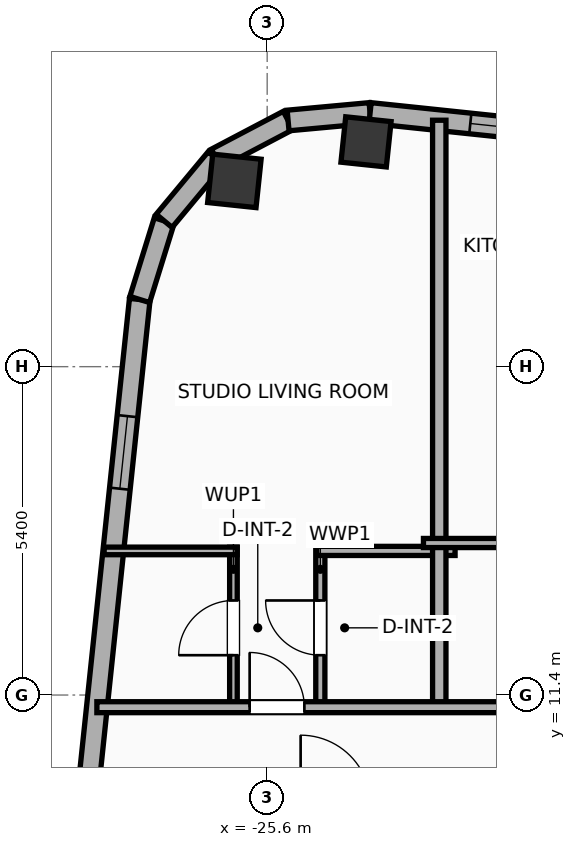
"""IFC4 building model, lengths in metres.
Left out: names, types, materials, properties, quantities, classifications, styles, units other than length and angle.
Written with IfcOpenShell. Run it as: python <this file> out.ifc"""

import sys

from ifc_helpers import new_model, si_unit, direction, frame, frame_2d, origin, origin_2d, place, context, subcontext, project, spatial, rectangle, hollow_rectangle, hollow_circle, extrude, element, fill, save


model = new_model("IFC4")
c1 = context("Model", 3, precision=1e-05, world=origin(), true_north=direction((0.0, 1.0)))
c2 = subcontext(c1, "Body", "Model", "MODEL_VIEW")
j1 = project(units=[si_unit("LENGTHUNIT", "METRE"), si_unit("PLANEANGLEUNIT", "RADIAN")], contexts=[c1])
p1 = place(None, origin())
s1 = spatial("IfcSite", under=j1, at=p1, CompositionType="ELEMENT")
p2 = place(p1, origin())
s2 = spatial("IfcBuilding", under=s1, at=p2, CompositionType="ELEMENT")
p3 = place(p2, frame((0.0, 0.0, 287.3)))
s3 = spatial("IfcBuildingStorey", under=s2, at=p3, CompositionType="ELEMENT", Elevation=287.3)
p4 = place(p3, frame((-23.975, 20.497, 0.0), z_axis=(0.0, 0.0, 1.0), x_axis=(0.994521895368, -0.104528463268, 0.0)))
e1 = element("IfcColumn", 1, at=p4, inside=s3, PredefinedType="COLUMN", context=c2, shape_type="SweptSolid", body=[
    extrude(hollow_rectangle(XDim=0.75, YDim=0.75, WallThickness=0.025, at=origin_2d()), origin(), (0.0, 0.0, 1.0), 3.9),
])
p5 = place(p3, frame((-26.139, 19.855, 0.0), z_axis=(0.0, 0.0, 1.0), x_axis=(0.994521895368, -0.104528463268, 0.0)))
e2 = element("IfcColumn", 2, at=p5, inside=s3, PredefinedType="COLUMN", context=c2, shape_type="SweptSolid", body=[
    extrude(hollow_circle(Radius=0.4, WallThickness=0.028, at=origin_2d()), origin(), (0.0, 0.0, 1.0), 3.9),
])
p6 = place(p3, frame((-30.87, -12.296, 0.0), z_axis=(0.0, 0.0, 1.0), x_axis=(0.104533282919, 0.994521388791, 0.0)))
e3 = element("IfcWall", 3, at=p6, inside=s3, PredefinedType="ELEMENTEDWALL", context=c2, shape_type="SweptSolid", body=[
    extrude(rectangle(XDim=30.366, YDim=0.34, at=frame_2d((15.183, 0.0))), origin(), (0.0, 0.0, 1.0), 3.635),
])
p7 = place(p6, frame((5.842, 0.0, 0.75)))
e4 = element("IfcOpeningElement", 4, at=p7, cuts=e3, PredefinedType="OPENING", context=c2, shape_type="SweptSolid", body=[
    extrude(rectangle(XDim=1.8, YDim=2.1, at=frame_2d((0.9, 1.05))), frame((0.0, 0.18, 0.0), z_axis=(0.0, -1.0, 0.0), x_axis=(1.0, 0.0, 0.0)), (0.0, 0.0, 1.0), 0.36),
])
p8 = place(p6, frame((27.238, 0.0, 0.75)))
e5 = element("IfcOpeningElement", 5, at=p8, cuts=e3, PredefinedType="OPENING", context=c2, shape_type="SweptSolid", body=[
    extrude(rectangle(XDim=1.2, YDim=2.05, at=frame_2d((0.6, 1.025))), frame((0.0, 0.18, 0.0), z_axis=(0.0, -1.0, 0.0), x_axis=(1.0, 0.0, 0.0)), (0.0, 0.0, 1.0), 0.36),
])
p9 = place(p6, frame((16.688, 0.0, 0.75)))
e6 = element("IfcOpeningElement", 6, at=p9, cuts=e3, PredefinedType="OPENING", context=c2, shape_type="SweptSolid", body=[
    extrude(rectangle(XDim=1.2, YDim=2.05, at=frame_2d((0.6, 1.025))), frame((0.0, 0.18, 0.0), z_axis=(0.0, -1.0, 0.0), x_axis=(1.0, 0.0, 0.0)), (0.0, 0.0, 1.0), 0.36),
])
p10 = place(p3, frame((-27.696, 17.905, 0.0), z_axis=(0.0, 0.0, 1.0), x_axis=(0.296416228123, 0.955058856671, 0.0)))
e7 = element("IfcWall", 7, at=p10, inside=s3, PredefinedType="ELEMENTEDWALL", context=c2, shape_type="SweptSolid", body=[
    extrude(rectangle(XDim=1.354, YDim=0.34, at=frame_2d((0.677, 0.0))), origin(), (0.0, 0.0, 1.0), 3.635),
])
p11 = place(p3, frame((-27.294, 19.198, 0.0), z_axis=(0.0, 0.0, 1.0), x_axis=(0.639501603217, 0.768789762863, 0.0)))
e8 = element("IfcWall", 8, at=p11, inside=s3, PredefinedType="ELEMENTEDWALL", context=c2, shape_type="SweptSolid", body=[
    extrude(rectangle(XDim=1.337, YDim=0.34, at=frame_2d((0.668, 0.0))), origin(), (0.0, 0.0, 1.0), 3.635),
])
p12 = place(p3, frame((-26.439, 20.226, 0.0), z_axis=(0.0, 0.0, 1.0), x_axis=(0.884922182678, 0.465738908193, 0.0)))
e9 = element("IfcWall", 9, at=p12, inside=s3, PredefinedType="ELEMENTEDWALL", context=c2, shape_type="SweptSolid", body=[
    extrude(rectangle(XDim=1.337, YDim=0.34, at=frame_2d((0.668, 0.0))), origin(), (0.0, 0.0, 1.0), 3.635),
])
p13 = place(p3, frame((-25.256, 20.848, 0.0), z_axis=(0.0, 0.0, 1.0), x_axis=(0.995813013343, 0.091413579172, 0.0)))
e10 = element("IfcWall", 10, at=p13, inside=s3, PredefinedType="ELEMENTEDWALL", context=c2, shape_type="SweptSolid", body=[
    extrude(rectangle(XDim=1.354, YDim=0.34, at=frame_2d((0.677, 0.0))), origin(), (0.0, 0.0, 1.0), 3.635),
])
p14 = place(p3, frame((-23.908, 20.972, 0.0), z_axis=(0.0, 0.0, 1.0), x_axis=(0.994521888554, -0.104528528102, 0.0)))
e11 = element("IfcWall", 11, at=p14, inside=s3, PredefinedType="ELEMENTEDWALL", context=c2, shape_type="SweptSolid", body=[
    extrude(rectangle(XDim=46.766, YDim=0.34, at=frame_2d((23.383, 0.0))), origin(), (0.0, 0.0, 1.0), 3.635),
])
p15 = place(p14, frame((22.183, 0.0, 0.75)))
e12 = element("IfcOpeningElement", 12, at=p15, cuts=e11, PredefinedType="OPENING", context=c2, shape_type="SweptSolid", body=[
    extrude(rectangle(XDim=2.4, YDim=2.1, at=frame_2d((1.2, 1.05))), frame((0.0, 0.18, 0.0), z_axis=(0.0, -1.0, 0.0), x_axis=(1.0, 0.0, 0.0)), (0.0, 0.0, 1.0), 0.36),
])
p16 = place(p14, frame((4.49, 0.0, 0.75)))
e13 = element("IfcOpeningElement", 13, at=p16, cuts=e11, PredefinedType="OPENING", context=c2, shape_type="SweptSolid", body=[
    extrude(rectangle(XDim=1.2, YDim=2.05, at=frame_2d((0.6, 1.025))), frame((0.0, 0.18, 0.0), z_axis=(0.0, -1.0, 0.0), x_axis=(1.0, 0.0, 0.0)), (0.0, 0.0, 1.0), 0.36),
])
p17 = place(p14, frame((1.657, 0.0, 0.75)))
e14 = element("IfcOpeningElement", 14, at=p17, cuts=e11, PredefinedType="OPENING", context=c2, shape_type="SweptSolid", body=[
    extrude(rectangle(XDim=1.2, YDim=2.05, at=frame_2d((0.6, 1.025))), frame((0.0, 0.18, 0.0), z_axis=(0.0, -1.0, 0.0), x_axis=(1.0, 0.0, 0.0)), (0.0, 0.0, 1.0), 0.36),
])
p18 = place(p14, frame((9.885, 0.0, 0.75)))
e15 = element("IfcOpeningElement", 15, at=p18, cuts=e11, PredefinedType="OPENING", context=c2, shape_type="SweptSolid", body=[
    extrude(rectangle(XDim=1.2, YDim=2.05, at=frame_2d((0.6, 1.025))), frame((0.0, 0.18, 0.0), z_axis=(0.0, -1.0, 0.0), x_axis=(1.0, 0.0, 0.0)), (0.0, 0.0, 1.0), 0.36),
])
p19 = place(p14, frame((16.427, 0.0, 0.75)))
e16 = element("IfcOpeningElement", 16, at=p19, cuts=e11, PredefinedType="OPENING", context=c2, shape_type="SweptSolid", body=[
    extrude(rectangle(XDim=1.2, YDim=2.05, at=frame_2d((0.6, 1.025))), frame((0.0, 0.18, 0.0), z_axis=(0.0, -1.0, 0.0), x_axis=(1.0, 0.0, 0.0)), (0.0, 0.0, 1.0), 0.36),
])
p20 = place(p14, frame((13.159, 0.0, 0.75)))
e17 = element("IfcOpeningElement", 17, at=p20, cuts=e11, PredefinedType="OPENING", context=c2, shape_type="SweptSolid", body=[
    extrude(rectangle(XDim=1.2, YDim=2.05, at=frame_2d((0.6, 1.025))), frame((0.0, 0.18, 0.0), z_axis=(0.0, -1.0, 0.0), x_axis=(1.0, 0.0, 0.0)), (0.0, 0.0, 1.0), 0.36),
])
p21 = place(p14, frame((19.586, 0.0, 0.75)))
e18 = element("IfcOpeningElement", 18, at=p21, cuts=e11, PredefinedType="OPENING", context=c2, shape_type="SweptSolid", body=[
    extrude(rectangle(XDim=1.2, YDim=2.05, at=frame_2d((0.6, 1.025))), frame((0.0, 0.18, 0.0), z_axis=(0.0, -1.0, 0.0), x_axis=(1.0, 0.0, 0.0)), (0.0, 0.0, 1.0), 0.36),
])
p22 = place(p14, frame((28.687, 0.0, 0.75)))
e19 = element("IfcOpeningElement", 19, at=p22, cuts=e11, PredefinedType="OPENING", context=c2, shape_type="SweptSolid", body=[
    extrude(rectangle(XDim=1.2, YDim=2.05, at=frame_2d((0.6, 1.025))), frame((0.0, 0.18, 0.0), z_axis=(0.0, -1.0, 0.0), x_axis=(1.0, 0.0, 0.0)), (0.0, 0.0, 1.0), 0.36),
])
p23 = place(p14, frame((34.0, 0.0, 0.75)))
e20 = element("IfcOpeningElement", 20, at=p23, cuts=e11, PredefinedType="OPENING", context=c2, shape_type="SweptSolid", body=[
    extrude(rectangle(XDim=1.2, YDim=2.05, at=frame_2d((0.6, 1.025))), frame((0.0, 0.18, 0.0), z_axis=(0.0, -1.0, 0.0), x_axis=(1.0, 0.0, 0.0)), (0.0, 0.0, 1.0), 0.36),
])
p24 = place(p14, frame((38.775, 0.0, 0.75)))
e21 = element("IfcOpeningElement", 21, at=p24, cuts=e11, PredefinedType="OPENING", context=c2, shape_type="SweptSolid", body=[
    extrude(rectangle(XDim=1.2, YDim=2.05, at=frame_2d((0.6, 1.025))), frame((0.0, 0.18, 0.0), z_axis=(0.0, -1.0, 0.0), x_axis=(1.0, 0.0, 0.0)), (0.0, 0.0, 1.0), 0.36),
])
p25 = place(p14, frame((41.836, 0.0, 0.75)))
e22 = element("IfcOpeningElement", 22, at=p25, cuts=e11, PredefinedType="OPENING", context=c2, shape_type="SweptSolid", body=[
    extrude(rectangle(XDim=1.2, YDim=2.05, at=frame_2d((0.6, 1.025))), frame((0.0, 0.18, 0.0), z_axis=(0.0, -1.0, 0.0), x_axis=(1.0, 0.0, 0.0)), (0.0, 0.0, 1.0), 0.36),
])
p26 = place(p14, frame((44.206, 0.0, 0.75)))
e23 = element("IfcOpeningElement", 23, at=p26, cuts=e11, PredefinedType="OPENING", context=c2, shape_type="SweptSolid", body=[
    extrude(rectangle(XDim=1.2, YDim=2.05, at=frame_2d((0.6, 1.025))), frame((0.0, 0.18, 0.0), z_axis=(0.0, -1.0, 0.0), x_axis=(1.0, 0.0, 0.0)), (0.0, 0.0, 1.0), 0.36),
])
p27 = place(p3, frame((-26.155, 11.18, 0.0), z_axis=(0.0, 0.0, 1.0), x_axis=(0.0, 1.0, 0.0)))
e24 = element("IfcWall", 24, at=p27, inside=s3, PredefinedType="PARTITIONING", context=c2, shape_type="SweptSolid", body=[
    extrude(rectangle(XDim=2.65, YDim=0.125, at=frame_2d((1.325, 0.0))), origin(), (0.0, 0.0, 1.0), 3.635),
])
p28 = place(p27, frame((0.875, 0.0, 0.0)))
e25 = element("IfcOpeningElement", 25, at=p28, cuts=e24, PredefinedType="OPENING", context=c2, shape_type="SweptSolid", body=[
    extrude(rectangle(XDim=0.9, YDim=2.05, at=frame_2d((0.45, 1.025))), frame((0.0, 0.073, 0.0), z_axis=(0.0, -1.0, 0.0), x_axis=(1.0, 0.0, 0.0)), (0.0, 0.0, 1.0), 0.145),
])
p29 = place(p3, frame((-24.726, 11.18, 0.0), z_axis=(0.0, 0.0, 1.0), x_axis=(0.0, 1.0, 0.0)))
e26 = element("IfcWall", 26, at=p29, inside=s3, PredefinedType="PLUMBINGWALL", context=c2, shape_type="SweptSolid", body=[
    extrude(rectangle(XDim=2.65, YDim=0.15, at=frame_2d((1.325, 0.0))), origin(), (0.0, 0.0, 1.0), 3.635),
])
p30 = place(p29, frame((0.875, 0.0, 0.0)))
e27 = element("IfcOpeningElement", 27, at=p30, cuts=e26, PredefinedType="OPENING", context=c2, shape_type="SweptSolid", body=[
    extrude(rectangle(XDim=0.9, YDim=2.05, at=frame_2d((0.45, 1.025))), frame((0.0, 0.085, 0.0), z_axis=(0.0, -1.0, 0.0), x_axis=(1.0, 0.0, 0.0)), (0.0, 0.0, 1.0), 0.17),
])
p31 = place(p3, frame((-28.281, 13.77, 0.0), z_axis=(0.0, 0.0, 1.0), x_axis=(1.0, 0.0, 0.0)))
e28 = element("IfcWall", 28, at=p31, inside=s3, PredefinedType="PARTITIONING", context=c2, shape_type="SweptSolid", body=[
    extrude(rectangle(XDim=2.186, YDim=0.125, at=frame_2d((1.093, 0.0))), origin(), (0.0, 0.0, 1.0), 3.635),
])
p32 = place(p3, frame((-24.786, 13.77, 0.0), z_axis=(0.0, 0.0, 1.0), x_axis=(1.0, 0.0, 0.0)))
e29 = element("IfcWall", 29, at=p32, inside=s3, PredefinedType="PLUMBINGWALL", context=c2, shape_type="SweptSolid", body=[
    extrude(rectangle(XDim=2.276, YDim=0.15, at=frame_2d((1.138, 0.0))), origin(), (0.0, 0.0, 1.0), 3.635),
])
p33 = place(p3, frame((-22.77, 11.12, 0.0), z_axis=(0.0, 0.0, 1.0), x_axis=(0.0, 1.0, 0.0)))
e30 = element("IfcWall", 30, at=p33, inside=s3, PredefinedType="PARTITIONING", context=c2, shape_type="SweptSolid", body=[
    extrude(rectangle(XDim=9.732, YDim=0.22, at=frame_2d((4.866, 0.0))), origin(), (0.0, 0.0, 1.0), 3.075),
])
p34 = place(p3, frame((-23.03, 13.9, 0.0), z_axis=(0.0, 0.0, 1.0), x_axis=(1.0, 0.0, 0.0)))
e31 = element("IfcWall", 31, at=p34, inside=s3, PredefinedType="PLUMBINGWALL", context=c2, shape_type="SweptSolid", body=[
    extrude(rectangle(XDim=2.55, YDim=0.15, at=frame_2d((1.275, 0.0))), origin(), (0.0, 0.0, 1.0), 3.635),
])
p35 = place(p3, frame((-28.401, 11.2, 0.0), z_axis=(0.0, 0.0, 1.0), x_axis=(1.0, 0.0, 0.0)))
e32 = element("IfcWall", 32, at=p35, inside=s3, PredefinedType="PARTITIONING", context=c2, shape_type="SweptSolid", body=[
    extrude(rectangle(XDim=53.956, YDim=0.18, at=frame_2d((26.978, 0.0))), origin(), (0.0, 0.0, 1.0), 3.635),
])
p36 = place(p35, frame((2.512, 0.0, 0.0)))
e33 = element("IfcOpeningElement", 33, at=p36, cuts=e32, PredefinedType="OPENING", context=c2, shape_type="SweptSolid", body=[
    extrude(rectangle(XDim=0.9, YDim=2.05, at=frame_2d((0.45, 1.025))), frame((0.0, 0.1, 0.0), z_axis=(0.0, -1.0, 0.0), x_axis=(1.0, 0.0, 0.0)), (0.0, 0.0, 1.0), 0.2),
])
p37 = place(p35, frame((8.948, 0.0, 0.0)))
e34 = element("IfcOpeningElement", 34, at=p37, cuts=e32, PredefinedType="OPENING", context=c2, shape_type="SweptSolid", body=[
    extrude(rectangle(XDim=1.15, YDim=2.05, at=frame_2d((0.575, 1.025))), frame((0.0, 0.1, 0.0), z_axis=(0.0, -1.0, 0.0), x_axis=(1.0, 0.0, 0.0)), (0.0, 0.0, 1.0), 0.2),
])
p38 = place(p35, frame((13.821, 0.0, 0.0)))
e35 = element("IfcOpeningElement", 35, at=p38, cuts=e32, PredefinedType="OPENING", context=c2, shape_type="SweptSolid", body=[
    extrude(rectangle(XDim=0.9, YDim=2.05, at=frame_2d((0.45, 1.025))), frame((0.0, 0.1, 0.0), z_axis=(0.0, -1.0, 0.0), x_axis=(1.0, 0.0, 0.0)), (0.0, 0.0, 1.0), 0.2),
])
p39 = place(p35, frame((20.818, 0.0, 0.0)))
e36 = element("IfcOpeningElement", 36, at=p39, cuts=e32, PredefinedType="OPENING", context=c2, shape_type="SweptSolid", body=[
    extrude(rectangle(XDim=1.15, YDim=2.05, at=frame_2d((0.575, 1.025))), frame((0.0, 0.1, 0.0), z_axis=(0.0, -1.0, 0.0), x_axis=(1.0, 0.0, 0.0)), (0.0, 0.0, 1.0), 0.2),
])
p40 = place(p35, frame((27.212, 0.0, 0.0)))
e37 = element("IfcOpeningElement", 37, at=p40, cuts=e32, PredefinedType="OPENING", context=c2, shape_type="SweptSolid", body=[
    extrude(rectangle(XDim=1.15, YDim=2.05, at=frame_2d((0.575, 1.025))), frame((0.0, 0.1, 0.0), z_axis=(0.0, -1.0, 0.0), x_axis=(1.0, 0.0, 0.0)), (0.0, 0.0, 1.0), 0.2),
])
p41 = place(p35, frame((32.576, 0.0, 0.0)))
e38 = element("IfcOpeningElement", 38, at=p41, cuts=e32, PredefinedType="OPENING", context=c2, shape_type="SweptSolid", body=[
    extrude(rectangle(XDim=0.9, YDim=2.05, at=frame_2d((0.45, 1.025))), frame((0.0, 0.1, 0.0), z_axis=(0.0, -1.0, 0.0), x_axis=(1.0, 0.0, 0.0)), (0.0, 0.0, 1.0), 0.2),
])
p42 = place(p35, frame((38.576, 0.0, 0.0)))
e39 = element("IfcOpeningElement", 39, at=p42, cuts=e32, PredefinedType="OPENING", context=c2, shape_type="SweptSolid", body=[
    extrude(rectangle(XDim=0.9, YDim=2.05, at=frame_2d((0.45, 1.025))), frame((0.0, 0.1, 0.0), z_axis=(0.0, -1.0, 0.0), x_axis=(1.0, 0.0, 0.0)), (0.0, 0.0, 1.0), 0.2),
])
p43 = place(p35, frame((43.102, 0.0, 0.0)))
e40 = element("IfcOpeningElement", 40, at=p43, cuts=e32, PredefinedType="OPENING", context=c2, shape_type="SweptSolid", body=[
    extrude(rectangle(XDim=1.15, YDim=2.05, at=frame_2d((0.575, 1.025))), frame((0.0, 0.1, 0.0), z_axis=(0.0, -1.0, 0.0), x_axis=(1.0, 0.0, 0.0)), (0.0, 0.0, 1.0), 0.2),
])
p44 = place(p35, frame((50.732, 0.0, 0.0)))
e41 = element("IfcOpeningElement", 41, at=p44, cuts=e32, PredefinedType="OPENING", context=c2, shape_type="SweptSolid", body=[
    extrude(rectangle(XDim=0.9, YDim=2.05, at=frame_2d((0.45, 1.025))), frame((0.0, 0.1, 0.0), z_axis=(0.0, -1.0, 0.0), x_axis=(1.0, 0.0, 0.0)), (0.0, 0.0, 1.0), 0.2),
])
p45 = place(p8, origin())
e42 = element("IfcWindow", 42, at=p45, inside=s3, PartitioningType="SINGLE_PANEL", PredefinedType="WINDOW", context=c2, shape_type="SweptSolid", body=[
    extrude(rectangle(XDim=1.2, YDim=2.05, at=frame_2d((0.6, 1.025))), frame((0.0, 0.03, 0.0), z_axis=(0.0, -1.0, 0.0), x_axis=(1.0, 0.0, 0.0)), (0.0, 0.0, 1.0), 0.06),
])
fill(e5, e42)
p46 = place(p17, origin())
e43 = element("IfcWindow", 43, at=p46, inside=s3, PartitioningType="SINGLE_PANEL", PredefinedType="WINDOW", context=c2, shape_type="SweptSolid", body=[
    extrude(rectangle(XDim=1.2, YDim=2.05, at=frame_2d((0.6, 1.025))), frame((0.0, 0.03, 0.0), z_axis=(0.0, -1.0, 0.0), x_axis=(1.0, 0.0, 0.0)), (0.0, 0.0, 1.0), 0.06),
])
fill(e14, e43)
p47 = place(p28, origin())
e44 = element("IfcDoor", 44, at=p47, inside=s3, OperationType="SINGLE_SWING_LEFT", PredefinedType="DOOR", context=c2, shape_type="SweptSolid", body=[
    extrude(rectangle(XDim=0.9, YDim=2.05, at=frame_2d((0.45, 1.025))), frame((0.0, 0.025, 0.0), z_axis=(0.0, -1.0, 0.0), x_axis=(1.0, 0.0, 0.0)), (0.0, 0.0, 1.0), 0.05),
])
fill(e25, e44)
p48 = place(p30, origin())
e45 = element("IfcDoor", 45, at=p48, inside=s3, OperationType="SINGLE_SWING_RIGHT", PredefinedType="DOOR", context=c2, shape_type="SweptSolid", body=[
    extrude(rectangle(XDim=0.9, YDim=2.05, at=frame_2d((0.45, 1.025))), frame((0.0, 0.025, 0.0), z_axis=(0.0, -1.0, 0.0), x_axis=(1.0, 0.0, 0.0)), (0.0, 0.0, 1.0), 0.05),
])
fill(e27, e45)
p49 = place(p36, origin())
e46 = element("IfcDoor", 46, at=p49, inside=s3, OperationType="SINGLE_SWING_LEFT", PredefinedType="DOOR", context=c2, shape_type="SweptSolid", body=[
    extrude(rectangle(XDim=0.9, YDim=2.05, at=frame_2d((0.45, 1.025))), frame((0.0, 0.025, 0.0), z_axis=(0.0, -1.0, 0.0), x_axis=(1.0, 0.0, 0.0)), (0.0, 0.0, 1.0), 0.05),
])
fill(e33, e46)
save(model, sys.argv[1])
